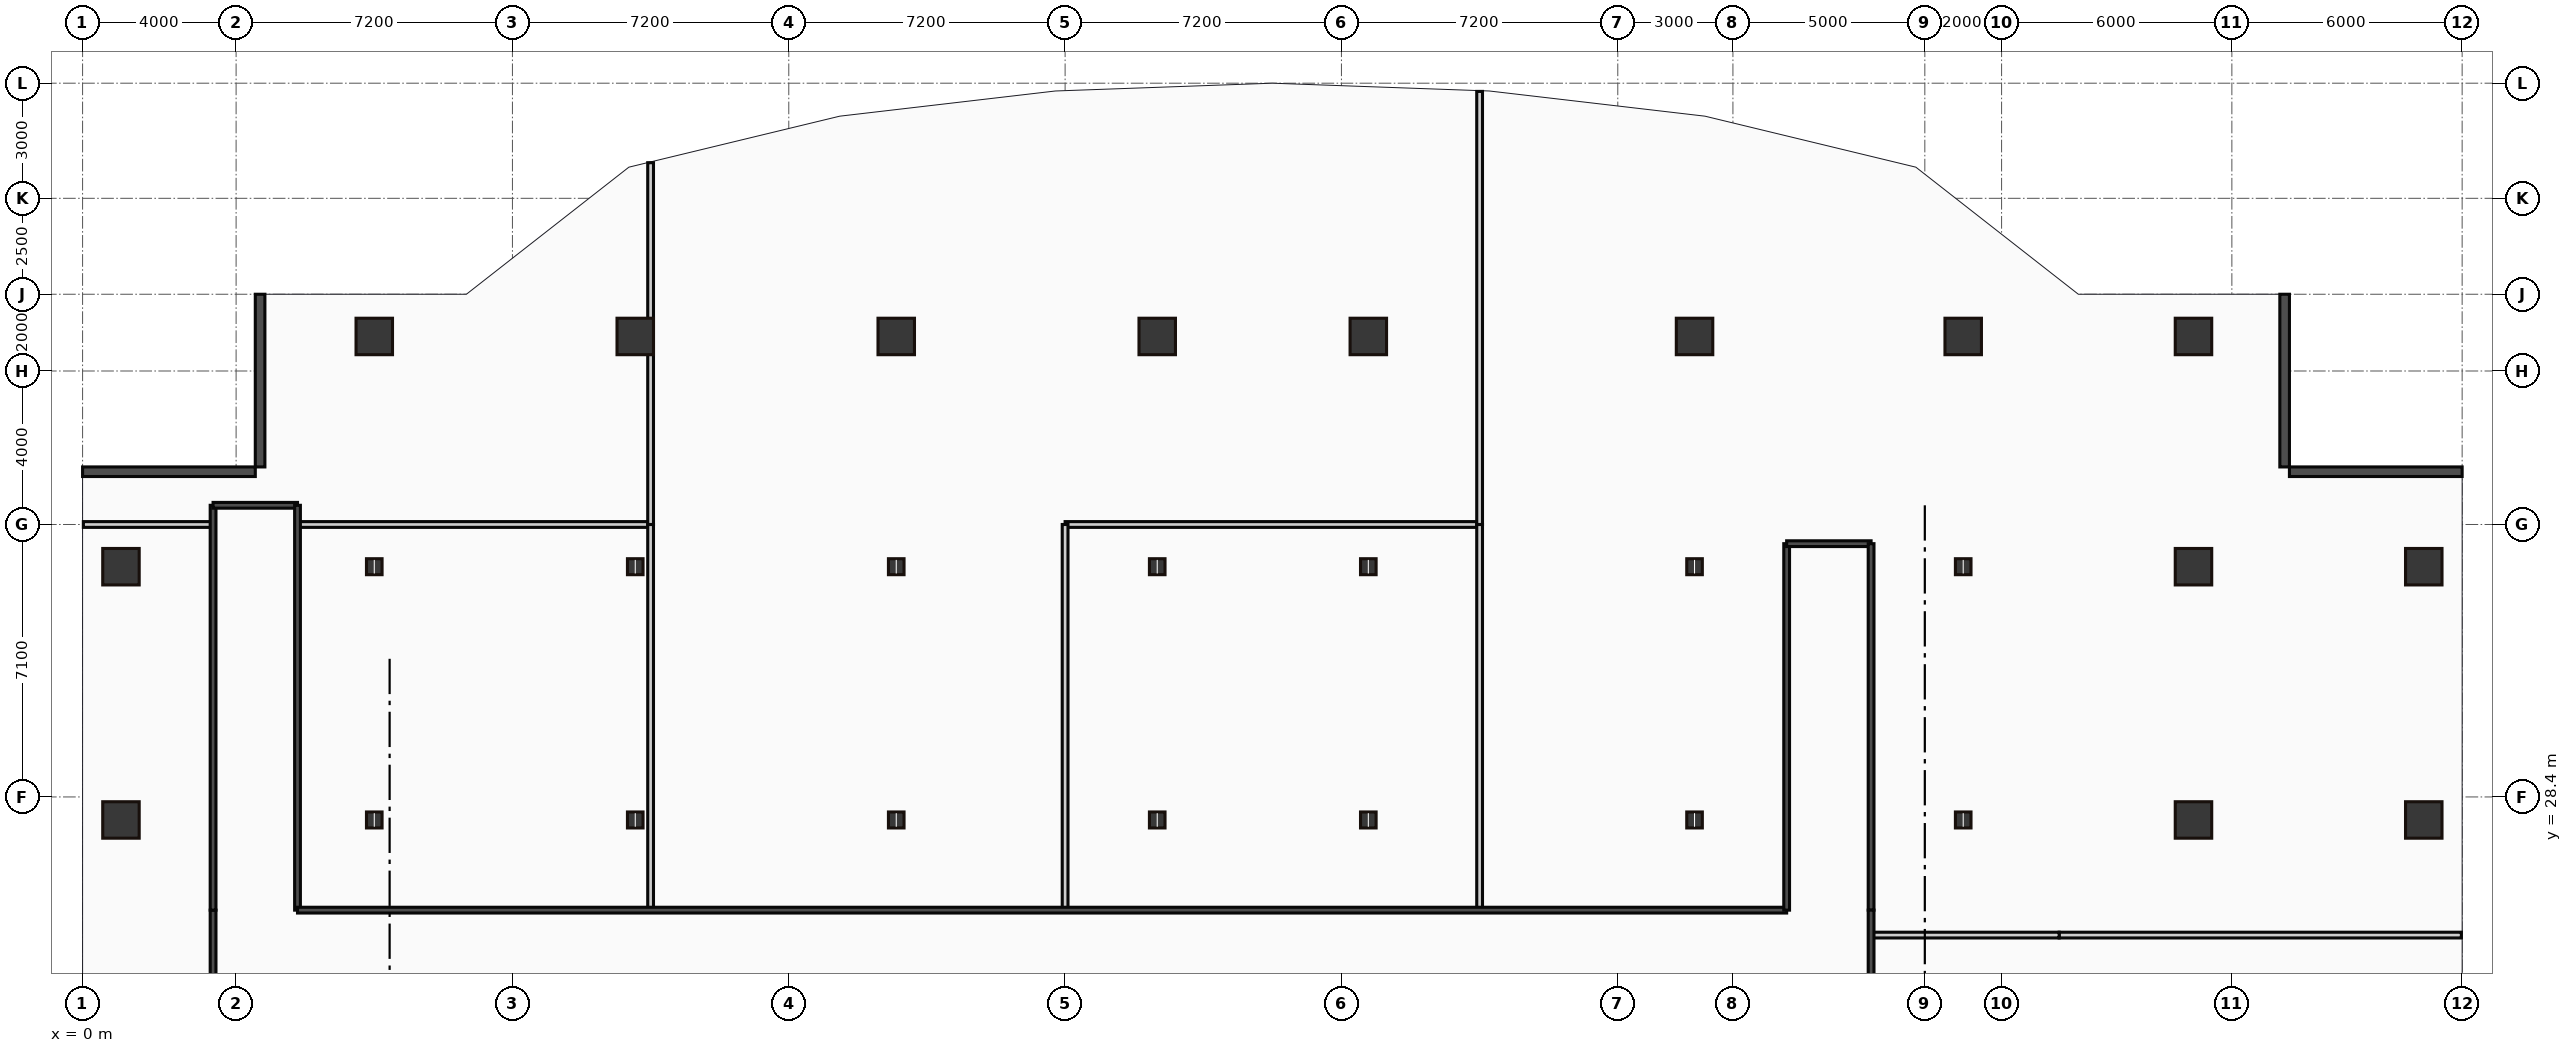
"""IFC4 building model, lengths in metres.
Left out: names, types, materials, properties, quantities, classifications, styles, units other than length and angle.
Written with IfcOpenShell. Run it as: python <this file> out.ifc"""

import sys

from ifc_helpers import new_model, si_unit, direction, frame, frame_2d, origin, origin_2d, place, context, subcontext, project, spatial, rectangle, hollow_rectangle, i_section, extrude, source, transform, mapped, element, fill, save


model = new_model("IFC4")
c1 = context("Model", 3, precision=1e-05, world=origin(), true_north=direction((0.0, 1.0)))
c2 = subcontext(c1, "Body", "Model", "MODEL_VIEW")
j1 = project(units=[si_unit("LENGTHUNIT", "METRE"), si_unit("PLANEANGLEUNIT", "RADIAN")], contexts=[c1])
p1 = place(None, origin())
s1 = spatial("IfcSite", under=j1, at=p1, CompositionType="ELEMENT")
p2 = place(p1, origin())
s2 = spatial("IfcBuilding", under=s1, at=p2, CompositionType="ELEMENT")
p3 = place(p2, frame((0.0, 0.0, 32.5)))
s3 = spatial("IfcBuildingStorey", under=s2, at=p3, CompositionType="ELEMENT", Elevation=32.5)
m1 = source(origin(), c2, "Body", "SweptSolid", [
    extrude(hollow_rectangle(XDim=0.95, YDim=0.95, WallThickness=0.045, at=origin_2d()), origin(), (0.0, 0.0, 1.0), 3.65),
])
for number, where, z_axis, x_axis in (
    (1, (1.0, 27.8, 0.0), (0.0, 0.0, 1.0), (1.0, 0.0, 0.0)),
    (2, (1.0, 34.4, 0.0), (0.0, 0.0, 1.0), (1.0, 0.0, 0.0)),
):
    element("IfcColumn", number, at=place(p3, frame(where, z_axis=z_axis, x_axis=x_axis)), inside=s3, PredefinedType="COLUMN", context=c2, shape_type="MappedRepresentation", body=[
        mapped(m1, transform((0.0, 0.0, 0.0))),
    ])
m2 = source(origin(), c2, "Body", "SweptSolid", [
    extrude(i_section(OverallWidth=0.406, OverallDepth=0.416, WebThickness=0.03, FlangeThickness=0.048, at=origin_2d()), origin(), (0.0, 0.0, 1.0), 3.65),
])
for number, where, z_axis, x_axis in (
    (3, (7.6, 27.8, 0.0), (0.0, 0.0, 1.0), (1.0, 0.0, 0.0)),
    (4, (7.6, 34.4, 0.0), (0.0, 0.0, 1.0), (1.0, 0.0, 0.0)),
):
    element("IfcColumn", number, at=place(p3, frame(where, z_axis=z_axis, x_axis=x_axis)), inside=s3, PredefinedType="COLUMN", context=c2, shape_type="MappedRepresentation", body=[
        mapped(m2, transform((0.0, 0.0, 0.0))),
    ])
p4 = place(p3, frame((7.6, 40.4, 0.0), z_axis=(0.0, 0.0, 1.0), x_axis=(1.0, 0.0, 0.0)))
e5 = element("IfcColumn", 5, at=p4, inside=s3, PredefinedType="COLUMN", context=c2, shape_type="MappedRepresentation", body=[
    mapped(m1, transform((0.0, 0.0, 0.0))),
])
for number, where, z_axis, x_axis in (
    (6, (14.4, 27.8, 0.0), (0.0, 0.0, 1.0), (1.0, 0.0, 0.0)),
    (7, (14.4, 34.4, 0.0), (0.0, 0.0, 1.0), (1.0, 0.0, 0.0)),
):
    element("IfcColumn", number, at=place(p3, frame(where, z_axis=z_axis, x_axis=x_axis)), inside=s3, PredefinedType="COLUMN", context=c2, shape_type="MappedRepresentation", body=[
        mapped(m2, transform((0.0, 0.0, 0.0))),
    ])
p5 = place(p3, frame((14.4, 40.4, 0.0), z_axis=(0.0, 0.0, 1.0), x_axis=(1.0, 0.0, 0.0)))
e8 = element("IfcColumn", 8, at=p5, inside=s3, PredefinedType="COLUMN", context=c2, shape_type="MappedRepresentation", body=[
    mapped(m1, transform((0.0, 0.0, 0.0))),
])
for number, where, z_axis, x_axis in (
    (9, (21.2, 27.8, 0.0), (0.0, 0.0, 1.0), (1.0, 0.0, 0.0)),
    (10, (21.2, 34.4, 0.0), (0.0, 0.0, 1.0), (1.0, 0.0, 0.0)),
):
    element("IfcColumn", number, at=place(p3, frame(where, z_axis=z_axis, x_axis=x_axis)), inside=s3, PredefinedType="COLUMN", context=c2, shape_type="MappedRepresentation", body=[
        mapped(m2, transform((0.0, 0.0, 0.0))),
    ])
p6 = place(p3, frame((21.2, 40.4, 0.0), z_axis=(0.0, 0.0, 1.0), x_axis=(1.0, 0.0, 0.0)))
e11 = element("IfcColumn", 11, at=p6, inside=s3, PredefinedType="COLUMN", context=c2, shape_type="MappedRepresentation", body=[
    mapped(m1, transform((0.0, 0.0, 0.0))),
])
for number, where, z_axis, x_axis in (
    (12, (28.0, 27.8, 0.0), (0.0, 0.0, 1.0), (1.0, 0.0, 0.0)),
    (13, (28.0, 34.4, 0.0), (0.0, 0.0, 1.0), (1.0, 0.0, 0.0)),
):
    element("IfcColumn", number, at=place(p3, frame(where, z_axis=z_axis, x_axis=x_axis)), inside=s3, PredefinedType="COLUMN", context=c2, shape_type="MappedRepresentation", body=[
        mapped(m2, transform((0.0, 0.0, 0.0))),
    ])
p7 = place(p3, frame((28.0, 40.4, 0.0), z_axis=(0.0, 0.0, 1.0), x_axis=(1.0, 0.0, 0.0)))
e14 = element("IfcColumn", 14, at=p7, inside=s3, PredefinedType="COLUMN", context=c2, shape_type="MappedRepresentation", body=[
    mapped(m1, transform((0.0, 0.0, 0.0))),
])
for number, where, z_axis, x_axis in (
    (15, (33.5, 27.8, 0.0), (0.0, 0.0, 1.0), (1.0, 0.0, 0.0)),
    (16, (33.5, 34.4, 0.0), (0.0, 0.0, 1.0), (1.0, 0.0, 0.0)),
):
    element("IfcColumn", number, at=place(p3, frame(where, z_axis=z_axis, x_axis=x_axis)), inside=s3, PredefinedType="COLUMN", context=c2, shape_type="MappedRepresentation", body=[
        mapped(m2, transform((0.0, 0.0, 0.0))),
    ])
p8 = place(p3, frame((33.5, 40.4, 0.0), z_axis=(0.0, 0.0, 1.0), x_axis=(1.0, 0.0, 0.0)))
e17 = element("IfcColumn", 17, at=p8, inside=s3, PredefinedType="COLUMN", context=c2, shape_type="MappedRepresentation", body=[
    mapped(m1, transform((0.0, 0.0, 0.0))),
])
for number, where, z_axis, x_axis in (
    (18, (42.0, 27.8, 0.0), (0.0, 0.0, 1.0), (1.0, 0.0, 0.0)),
    (19, (42.0, 34.4, 0.0), (0.0, 0.0, 1.0), (1.0, 0.0, 0.0)),
):
    element("IfcColumn", number, at=place(p3, frame(where, z_axis=z_axis, x_axis=x_axis)), inside=s3, PredefinedType="COLUMN", context=c2, shape_type="MappedRepresentation", body=[
        mapped(m2, transform((0.0, 0.0, 0.0))),
    ])
p9 = place(p3, frame((42.0, 40.4, 0.0), z_axis=(0.0, 0.0, 1.0), x_axis=(1.0, 0.0, 0.0)))
e20 = element("IfcColumn", 20, at=p9, inside=s3, PredefinedType="COLUMN", context=c2, shape_type="MappedRepresentation", body=[
    mapped(m1, transform((0.0, 0.0, 0.0))),
])
for number, where, z_axis, x_axis in (
    (21, (49.0, 27.8, 0.0), (0.0, 0.0, 1.0), (1.0, 0.0, 0.0)),
    (22, (49.0, 34.4, 0.0), (0.0, 0.0, 1.0), (1.0, 0.0, 0.0)),
):
    element("IfcColumn", number, at=place(p3, frame(where, z_axis=z_axis, x_axis=x_axis)), inside=s3, PredefinedType="COLUMN", context=c2, shape_type="MappedRepresentation", body=[
        mapped(m2, transform((0.0, 0.0, 0.0))),
    ])
for number, where, z_axis, x_axis in (
    (23, (49.0, 40.4, 0.0), (0.0, 0.0, 1.0), (1.0, 0.0, 0.0)),
    (24, (55.0, 27.8, 0.0), (0.0, 0.0, 1.0), (1.0, 0.0, 0.0)),
    (25, (55.0, 34.4, 0.0), (0.0, 0.0, 1.0), (1.0, 0.0, 0.0)),
    (26, (55.0, 40.4, 0.0), (0.0, 0.0, 1.0), (1.0, 0.0, 0.0)),
    (27, (61.0, 27.8, 0.0), (0.0, 0.0, 1.0), (1.0, 0.0, 0.0)),
    (28, (61.0, 34.4, 0.0), (0.0, 0.0, 1.0), (1.0, 0.0, 0.0)),
):
    element("IfcColumn", number, at=place(p3, frame(where, z_axis=z_axis, x_axis=x_axis)), inside=s3, PredefinedType="COLUMN", context=c2, shape_type="MappedRepresentation", body=[
        mapped(m1, transform((0.0, 0.0, 0.0))),
    ])
m3 = source(origin(), c2, "Body", "SweptSolid", [
    extrude(rectangle(XDim=4.5, YDim=0.25, at=frame_2d((2.25, 0.0))), origin(), (0.0, 0.0, 1.0), 3.4),
])
for number, where, z_axis, x_axis in (
    (29, (62.0, 36.875, 0.0), (0.0, 0.0, 1.0), (-1.0, 0.0, 0.0)),
    (30, (57.375, 37.0, 0.0), (0.0, 0.0, 1.0), (0.0, 1.0, 0.0)),
    (31, (4.625, 41.5, 0.0), (0.0, 0.0, 1.0), (0.0, -1.0, 0.0)),
    (32, (4.5, 36.875, 0.0), (0.0, 0.0, 1.0), (-1.0, 0.0, 0.0)),
):
    element("IfcWall", number, at=place(p3, frame(where, z_axis=z_axis, x_axis=x_axis)), inside=s3, PredefinedType="STANDARD", context=c2, shape_type="MappedRepresentation", body=[
        mapped(m3, transform((0.0, 0.0, 0.0))),
    ])
m4 = source(origin(), c2, "Body", "SweptSolid", [
    extrude(rectangle(XDim=2.05, YDim=0.15, at=frame_2d((1.025, 0.0))), origin(), (0.0, 0.0, 1.0), 3.4),
])
p10 = place(p3, frame((3.4, 23.4, 0.0), z_axis=(0.0, 0.0, 1.0), x_axis=(0.0, 1.0, 0.0)))
e33 = element("IfcWall", 33, at=p10, inside=s3, PredefinedType="PARTITIONING", context=c2, shape_type="MappedRepresentation", body=[
    mapped(m4, transform((0.0, 0.0, 0.0))),
])
m5 = source(origin(), c2, "Body", "SweptSolid", [
    extrude(rectangle(XDim=10.55, YDim=0.15, at=frame_2d((5.275, 0.0))), origin(), (0.0, 0.0, 1.0), 3.4),
])
p11 = place(p3, frame((3.4, 25.45, 0.0), z_axis=(0.0, 0.0, 1.0), x_axis=(0.0, 1.0, 0.0)))
e34 = element("IfcWall", 34, at=p11, inside=s3, PredefinedType="PARTITIONING", context=c2, shape_type="MappedRepresentation", body=[
    mapped(m5, transform((0.0, 0.0, 0.0))),
])
p12 = place(p11, frame((4.68, 0.0, 0.0)))
e35 = element("IfcOpeningElement", 35, at=p12, cuts=e34, PredefinedType="OPENING", context=c2, shape_type="SweptSolid", body=[
    extrude(rectangle(XDim=0.95, YDim=2.15, at=frame_2d((0.475, 1.075))), frame((0.0, 0.085, 0.0), z_axis=(0.0, -1.0, 0.0), x_axis=(1.0, 0.0, 0.0)), (0.0, 0.0, 1.0), 0.17),
])
m6 = source(origin(), c2, "Body", "SweptSolid", [
    extrude(rectangle(XDim=2.2, YDim=0.15, at=frame_2d((1.1, 0.0))), origin(), (0.0, 0.0, 1.0), 3.4),
])
p13 = place(p3, frame((3.4, 36.0, 0.0), z_axis=(0.0, 0.0, 1.0), x_axis=(1.0, 0.0, 0.0)))
e36 = element("IfcWall", 36, at=p13, inside=s3, PredefinedType="PARTITIONING", context=c2, shape_type="MappedRepresentation", body=[
    mapped(m6, transform((0.0, 0.0, 0.0))),
])
p14 = place(p13, frame((0.625, 0.0, 0.0)))
e37 = element("IfcOpeningElement", 37, at=p14, cuts=e36, PredefinedType="OPENING", context=c2, shape_type="SweptSolid", body=[
    extrude(rectangle(XDim=0.95, YDim=2.15, at=frame_2d((0.475, 1.075))), frame((0.0, 0.085, 0.0), z_axis=(0.0, -1.0, 0.0), x_axis=(1.0, 0.0, 0.0)), (0.0, 0.0, 1.0), 0.17),
])
p15 = place(p3, frame((5.6, 36.0, 0.0), z_axis=(0.0, 0.0, 1.0), x_axis=(0.0, -1.0, 0.0)))
e38 = element("IfcWall", 38, at=p15, inside=s3, PredefinedType="PARTITIONING", context=c2, shape_type="MappedRepresentation", body=[
    mapped(m5, transform((0.0, 0.0, 0.0))),
])
p16 = place(p15, frame((4.92, 0.0, 0.0)))
e39 = element("IfcOpeningElement", 39, at=p16, cuts=e38, PredefinedType="OPENING", context=c2, shape_type="SweptSolid", body=[
    extrude(rectangle(XDim=0.95, YDim=2.15, at=frame_2d((0.475, 1.075))), frame((0.0, 0.085, 0.0), z_axis=(0.0, -1.0, 0.0), x_axis=(1.0, 0.0, 0.0)), (0.0, 0.0, 1.0), 0.17),
])
m7 = source(origin(), c2, "Body", "SweptSolid", [
    extrude(rectangle(XDim=38.8, YDim=0.15, at=frame_2d((19.4, 0.0))), origin(), (0.0, 0.0, 1.0), 3.4),
])
p17 = place(p3, frame((5.6, 25.45, 0.0), z_axis=(0.0, 0.0, 1.0), x_axis=(1.0, 0.0, 0.0)))
e40 = element("IfcWall", 40, at=p17, inside=s3, PredefinedType="PARTITIONING", context=c2, shape_type="MappedRepresentation", body=[
    mapped(m7, transform((0.0, 0.0, 0.0))),
])
p18 = place(p17, frame((14.125, 0.0, 0.0)))
e41 = element("IfcOpeningElement", 41, at=p18, cuts=e40, PredefinedType="OPENING", context=c2, shape_type="SweptSolid", body=[
    extrude(rectangle(XDim=0.95, YDim=2.15, at=frame_2d((0.475, 1.075))), frame((0.0, 0.085, 0.0), z_axis=(0.0, -1.0, 0.0), x_axis=(1.0, 0.0, 0.0)), (0.0, 0.0, 1.0), 0.17),
])
p19 = place(p17, frame((24.925, 0.0, 0.0)))
e42 = element("IfcOpeningElement", 42, at=p19, cuts=e40, PredefinedType="OPENING", context=c2, shape_type="SweptSolid", body=[
    extrude(rectangle(XDim=0.95, YDim=2.15, at=frame_2d((0.475, 1.075))), frame((0.0, 0.085, 0.0), z_axis=(0.0, -1.0, 0.0), x_axis=(1.0, 0.0, 0.0)), (0.0, 0.0, 1.0), 0.17),
])
m8 = source(origin(), c2, "Body", "SweptSolid", [
    extrude(rectangle(XDim=9.55, YDim=0.15, at=frame_2d((4.775, 0.0))), origin(), (0.0, 0.0, 1.0), 3.4),
])
p20 = place(p3, frame((44.4, 25.45, 0.0), z_axis=(0.0, 0.0, 1.0), x_axis=(0.0, 1.0, 0.0)))
e43 = element("IfcWall", 43, at=p20, inside=s3, PredefinedType="PARTITIONING", context=c2, shape_type="MappedRepresentation", body=[
    mapped(m8, transform((0.0, 0.0, 0.0))),
])
p21 = place(p20, frame((4.3, 0.0, 0.0)))
e44 = element("IfcOpeningElement", 44, at=p21, cuts=e43, PredefinedType="OPENING", context=c2, shape_type="SweptSolid", body=[
    extrude(rectangle(XDim=0.95, YDim=2.15, at=frame_2d((0.475, 1.075))), frame((0.0, 0.085, 0.0), z_axis=(0.0, -1.0, 0.0), x_axis=(1.0, 0.0, 0.0)), (0.0, 0.0, 1.0), 0.17),
])
p22 = place(p3, frame((44.4, 35.0, 0.0), z_axis=(0.0, 0.0, 1.0), x_axis=(1.0, 0.0, 0.0)))
e45 = element("IfcWall", 45, at=p22, inside=s3, PredefinedType="PARTITIONING", context=c2, shape_type="MappedRepresentation", body=[
    mapped(m6, transform((0.0, 0.0, 0.0))),
])
p23 = place(p3, frame((46.6, 35.0, 0.0), z_axis=(0.0, 0.0, 1.0), x_axis=(0.0, -1.0, 0.0)))
e46 = element("IfcWall", 46, at=p23, inside=s3, PredefinedType="PARTITIONING", context=c2, shape_type="MappedRepresentation", body=[
    mapped(m8, transform((0.0, 0.0, 0.0))),
])
p24 = place(p3, frame((46.6, 25.45, 0.0), z_axis=(0.0, 0.0, 1.0), x_axis=(0.0, -1.0, 0.0)))
e47 = element("IfcWall", 47, at=p24, inside=s3, PredefinedType="PARTITIONING", context=c2, shape_type="MappedRepresentation", body=[
    mapped(m4, transform((0.0, 0.0, 0.0))),
])
m9 = source(origin(), c2, "Body", "SweptSolid", [
    extrude(rectangle(XDim=3.38, YDim=0.15, at=frame_2d((1.69, 0.0))), origin(), (0.0, 0.0, 1.0), 3.4),
])
p25 = place(p3, frame((0.02, 35.5, 0.0), z_axis=(0.0, 0.0, 1.0), x_axis=(1.0, 0.0, 0.0)))
e48 = element("IfcWall", 48, at=p25, inside=s3, PredefinedType="PARTITIONING", context=c2, shape_type="MappedRepresentation", body=[
    mapped(m9, transform((0.0, 0.0, 0.0))),
])
m10 = source(origin(), c2, "Body", "SweptSolid", [
    extrude(rectangle(XDim=9.2, YDim=0.15, at=frame_2d((4.6, 0.0))), origin(), (0.0, 0.0, 1.0), 3.4),
])
p26 = place(p3, frame((14.8, 35.5, 0.0), z_axis=(0.0, 0.0, 1.0), x_axis=(-1.0, 0.0, 0.0)))
e49 = element("IfcWall", 49, at=p26, inside=s3, PredefinedType="PARTITIONING", context=c2, shape_type="MappedRepresentation", body=[
    mapped(m10, transform((0.0, 0.0, 0.0))),
])
m11 = source(origin(), c2, "Body", "SweptSolid", [
    extrude(rectangle(XDim=10.05, YDim=0.15, at=frame_2d((5.025, 0.0))), origin(), (0.0, 0.0, 1.0), 3.4),
])
p27 = place(p3, frame((14.8, 35.5, 0.0), z_axis=(0.0, 0.0, 1.0), x_axis=(0.0, -1.0, 0.0)))
e50 = element("IfcWall", 50, at=p27, inside=s3, PredefinedType="PARTITIONING", context=c2, shape_type="MappedRepresentation", body=[
    mapped(m11, transform((0.0, 0.0, 0.0))),
])
m12 = source(origin(), c2, "Body", "SweptSolid", [
    extrude(rectangle(XDim=9.428, YDim=0.15, at=frame_2d((4.714, 0.0))), origin(), (0.0, 0.0, 1.0), 3.4),
])
p28 = place(p3, frame((14.8, 44.928, 0.0), z_axis=(0.0, 0.0, 1.0), x_axis=(0.0, -1.0, 0.0)))
e51 = element("IfcWall", 51, at=p28, inside=s3, PredefinedType="PARTITIONING", context=c2, shape_type="MappedRepresentation", body=[
    mapped(m12, transform((0.0, 0.0, 0.0))),
])
m13 = source(origin(), c2, "Body", "SweptSolid", [
    extrude(rectangle(XDim=10.8, YDim=0.15, at=frame_2d((5.4, 0.0))), origin(), (0.0, 0.0, 1.0), 3.4),
])
p29 = place(p3, frame((36.4, 35.5, 0.0), z_axis=(0.0, 0.0, 1.0), x_axis=(-1.0, 0.0, 0.0)))
e52 = element("IfcWall", 52, at=p29, inside=s3, PredefinedType="PARTITIONING", context=c2, shape_type="MappedRepresentation", body=[
    mapped(m13, transform((0.0, 0.0, 0.0))),
])
for number, where, z_axis, x_axis in (
    (53, (25.6, 35.5, 0.0), (0.0, 0.0, 1.0), (0.0, -1.0, 0.0)),
    (54, (36.4, 35.5, 0.0), (0.0, 0.0, 1.0), (0.0, -1.0, 0.0)),
):
    element("IfcWall", number, at=place(p3, frame(where, z_axis=z_axis, x_axis=x_axis)), inside=s3, PredefinedType="PARTITIONING", context=c2, shape_type="MappedRepresentation", body=[
        mapped(m11, transform((0.0, 0.0, 0.0))),
    ])
m14 = source(origin(), c2, "Body", "SweptSolid", [
    extrude(rectangle(XDim=11.286, YDim=0.15, at=frame_2d((5.643, 0.0))), origin(), (0.0, 0.0, 1.0), 3.4),
])
p30 = place(p3, frame((36.4, 46.786, 0.0), z_axis=(0.0, 0.0, 1.0), x_axis=(0.0, -1.0, 0.0)))
e55 = element("IfcWall", 55, at=p30, inside=s3, PredefinedType="PARTITIONING", context=c2, shape_type="MappedRepresentation", body=[
    mapped(m14, transform((0.0, 0.0, 0.0))),
])
m15 = source(origin(), c2, "Body", "SweptSolid", [
    extrude(rectangle(XDim=10.48, YDim=0.15, at=frame_2d((5.24, 0.0))), origin(), (0.0, 0.0, 1.0), 3.4),
])
p31 = place(p3, frame((61.98, 24.8, 0.0), z_axis=(0.0, 0.0, 1.0), x_axis=(-1.0, 0.0, 0.0)))
e56 = element("IfcWall", 56, at=p31, inside=s3, PredefinedType="PARTITIONING", context=c2, shape_type="MappedRepresentation", body=[
    mapped(m15, transform((0.0, 0.0, 0.0))),
])
m16 = source(origin(), c2, "Body", "SweptSolid", [
    extrude(rectangle(XDim=4.9, YDim=0.15, at=frame_2d((2.45, 0.0))), origin(), (0.0, 0.0, 1.0), 3.4),
])
p32 = place(p3, frame((51.5, 24.8, 0.0), z_axis=(0.0, 0.0, 1.0), x_axis=(-1.0, 0.0, 0.0)))
e57 = element("IfcWall", 57, at=p32, inside=s3, PredefinedType="PARTITIONING", context=c2, shape_type="MappedRepresentation", body=[
    mapped(m16, transform((0.0, 0.0, 0.0))),
])
m17 = source(origin(), c2, "Body", "SweptSolid", [
    extrude(rectangle(XDim=0.95, YDim=2.15, at=frame_2d((0.475, 1.075))), frame((0.0, 0.025, 0.0), z_axis=(0.0, -1.0, 0.0), x_axis=(1.0, 0.0, 0.0)), (0.0, 0.0, 1.0), 0.05),
])
p33 = place(p12, origin())
e58 = element("IfcDoor", 58, at=p33, inside=s3, OperationType="SINGLE_SWING_RIGHT", PredefinedType="DOOR", context=c2, shape_type="MappedRepresentation", body=[
    mapped(m17, transform((0.0, 0.0, 0.0))),
])
fill(e35, e58)
p34 = place(p14, origin())
e59 = element("IfcDoor", 59, at=p34, inside=s3, OperationType="SINGLE_SWING_LEFT", PredefinedType="DOOR", context=c2, shape_type="MappedRepresentation", body=[
    mapped(m17, transform((0.0, 0.0, 0.0))),
])
fill(e37, e59)
p35 = place(p16, origin())
e60 = element("IfcDoor", 60, at=p35, inside=s3, OperationType="SINGLE_SWING_LEFT", PredefinedType="DOOR", context=c2, shape_type="MappedRepresentation", body=[
    mapped(m17, transform((0.0, 0.0, 0.0))),
])
fill(e39, e60)
p36 = place(p18, origin())
e61 = element("IfcDoor", 61, at=p36, inside=s3, OperationType="SINGLE_SWING_LEFT", PredefinedType="DOOR", context=c2, shape_type="MappedRepresentation", body=[
    mapped(m17, transform((0.0, 0.0, 0.0))),
])
fill(e41, e61)
p37 = place(p19, origin())
e62 = element("IfcDoor", 62, at=p37, inside=s3, OperationType="SINGLE_SWING_LEFT", PredefinedType="DOOR", context=c2, shape_type="MappedRepresentation", body=[
    mapped(m17, transform((0.0, 0.0, 0.0))),
])
fill(e42, e62)
p38 = place(p21, origin())
e63 = element("IfcDoor", 63, at=p38, inside=s3, OperationType="SINGLE_SWING_LEFT", PredefinedType="DOOR", context=c2, shape_type="MappedRepresentation", body=[
    mapped(m17, transform((0.0, 0.0, 0.0))),
])
fill(e44, e63)
save(model, sys.argv[1])
